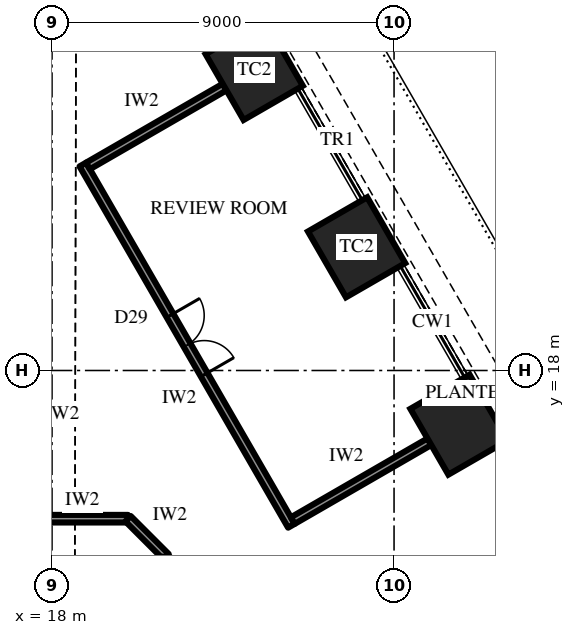
"""IFC4 building model, lengths in metres.
Left out: names, types, materials, properties, quantities, classifications, styles, units other than length and angle.
Written with IfcOpenShell. Run it as: python <this file> out.ifc"""

import sys

from ifc_helpers import new_model, si_unit, direction, frame, frame_2d, origin, origin_2d, place, context, subcontext, project, spatial, rectangle, extrude, element, fill, save


model = new_model("IFC4")
c1 = context("Model", 3, precision=1e-05, world=origin(), true_north=direction((0.0, 1.0)))
c2 = subcontext(c1, "Body", "Model", "MODEL_VIEW")
j1 = project(units=[si_unit("LENGTHUNIT", "METRE"), si_unit("PLANEANGLEUNIT", "RADIAN")], contexts=[c1])
p1 = place(None, origin())
s1 = spatial("IfcSite", under=j1, at=p1, CompositionType="ELEMENT")
p2 = place(p1, origin())
s2 = spatial("IfcBuilding", under=s1, at=p2, CompositionType="ELEMENT")
p3 = place(p2, frame((0.0, 0.0, 57.1)))
s3 = spatial("IfcBuildingStorey", under=s2, at=p3, CompositionType="ELEMENT", Elevation=57.1)
for number, where, z_axis, x_axis in (
    (1, (28.709, 16.575, 0.0), (0.0, 0.0, 1.0), (-0.5, 0.866, 0.0)),
    (2, (26.014, 21.242, 0.0), (0.0, 0.0, 1.0), (-0.5, 0.866, 0.0)),
    (3, (23.32, 25.908, 0.0), (0.0, 0.0, 1.0), (-0.5, 0.866, 0.0)),
):
    element("IfcColumn", number, at=place(p3, frame(where, z_axis=z_axis, x_axis=x_axis)), inside=s3, PredefinedType="COLUMN", context=c2, shape_type="SweptSolid", body=[
        extrude(rectangle(XDim=2.0, YDim=1.8, at=origin_2d()), origin(), (0.0, 0.0, 1.0), 4.2),
    ])
p4 = place(p3, frame((24.299, 13.913, 0.0), z_axis=(0.0, 0.0, 1.0), x_axis=(-0.500009305389, 0.866020031249, 0.0)))
e4 = element("IfcWall", 4, at=p4, inside=s3, PredefinedType="PARTITIONING", context=c2, shape_type="SweptSolid", body=[
    extrude(rectangle(XDim=10.977, YDim=0.2, at=frame_2d((5.489, 0.0))), origin(), (0.0, 0.0, 1.0), 4.0),
])
p5 = place(p4, frame((4.589, 0.0, 0.0)))
e5 = element("IfcOpeningElement", 5, at=p5, cuts=e4, PredefinedType="OPENING", context=c2, shape_type="SweptSolid", body=[
    extrude(rectangle(XDim=1.8, YDim=2.4, at=frame_2d((0.9, 1.2))), frame((0.0, 0.11, 0.0), z_axis=(0.0, -1.0, 0.0), x_axis=(1.0, 0.0, 0.0)), (0.0, 0.0, 1.0), 0.22),
])
p6 = place(p3, frame((24.335, 14.05, 0.0), z_axis=(0.0, 0.0, 1.0), x_axis=(0.86602981871, 0.499992353047, 0.0)))
e6 = element("IfcWall", 6, at=p6, inside=s3, PredefinedType="PARTITIONING", context=c2, shape_type="SweptSolid", body=[
    extrude(rectangle(XDim=4.15, YDim=0.2, at=frame_2d((2.075, 0.0))), origin(), (0.0, 0.0, 1.0), 4.0),
])
p7 = place(p3, frame((18.947, 23.383, 0.0), z_axis=(0.0, 0.0, 1.0), x_axis=(0.86602981871, 0.499992353047, 0.0)))
e7 = element("IfcWall", 7, at=p7, inside=s3, PredefinedType="PARTITIONING", context=c2, shape_type="SweptSolid", body=[
    extrude(rectangle(XDim=4.15, YDim=0.2, at=frame_2d((2.075, 0.0))), origin(), (0.0, 0.0, 1.0), 2.992),
])
p8 = place(p3, frame((17.6, 14.1, 0.0), z_axis=(0.0, 0.0, 1.0), x_axis=(1.0, 0.0, 0.0)))
e8 = element("IfcWall", 8, at=p8, inside=s3, PredefinedType="PARTITIONING", context=c2, shape_type="SweptSolid", body=[
    extrude(rectangle(XDim=2.4, YDim=0.2, at=frame_2d((1.2, 0.0))), origin(), (0.0, 0.0, 1.0), 4.0),
])
p9 = place(p3, frame((20.0, 14.1, 0.0), z_axis=(0.0, 0.0, 1.0), x_axis=(0.707106781187, -0.707106781187, 0.0)))
e9 = element("IfcWall", 9, at=p9, inside=s3, PredefinedType="PARTITIONING", context=c2, shape_type="SweptSolid", body=[
    extrude(rectangle(XDim=1.414, YDim=0.2, at=frame_2d((0.707, 0.0))), origin(), (0.0, 0.0, 1.0), 4.0),
])
p10 = place(p5, frame((1.8, 0.0, 0.0), z_axis=(0.0, 0.0, 1.0), x_axis=(-1.0, 0.0, 0.0)))
e10 = element("IfcDoor", 10, at=p10, inside=s3, OperationType="DOUBLE_DOOR_SINGLE_SWING", PredefinedType="DOOR", context=c2, shape_type="SweptSolid", body=[
    extrude(rectangle(XDim=1.8, YDim=2.4, at=frame_2d((0.9, 1.2))), frame((0.0, 0.025, 0.0), z_axis=(0.0, -1.0, 0.0), x_axis=(1.0, 0.0, 0.0)), (0.0, 0.0, 1.0), 0.05),
])
fill(e5, e10)
save(model, sys.argv[1])
